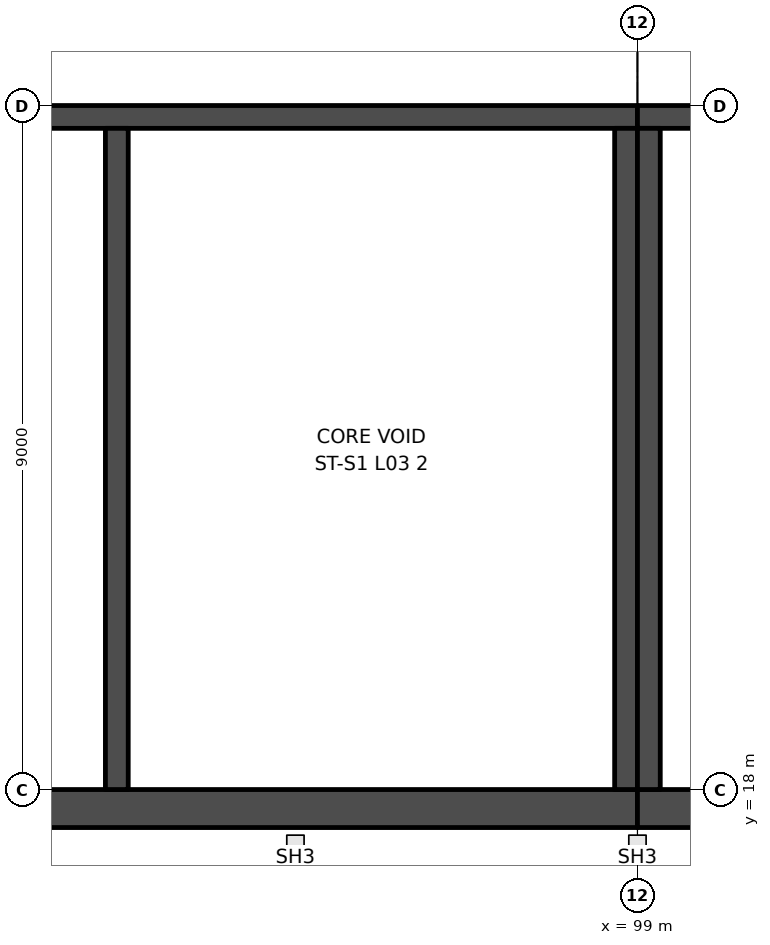
"""IFC4 building model, lengths in metres.
Left out: names, types, materials, properties, quantities, classifications, styles, units other than length and angle.
Written with IfcOpenShell. Run it as: python <this file> out.ifc"""

import sys

from ifc_helpers import new_model, si_unit, direction, frame, frame_2d, origin, place, context, subcontext, project, spatial, rectangle, extrude, element, save


model = new_model("IFC4")
c1 = context("Model", 3, precision=1e-05, world=origin(), true_north=direction((0.0, 1.0)))
c2 = subcontext(c1, "Body", "Model", "MODEL_VIEW")
j1 = project(units=[si_unit("LENGTHUNIT", "METRE"), si_unit("PLANEANGLEUNIT", "RADIAN")], contexts=[c1])
p1 = place(None, origin())
s1 = spatial("IfcSite", under=j1, at=p1, CompositionType="ELEMENT")
p2 = place(p1, origin())
s2 = spatial("IfcBuilding", under=s1, at=p2, CompositionType="ELEMENT")
p3 = place(p2, frame((0.0, 0.0, 22.0)))
s3 = spatial("IfcBuildingStorey", under=s2, at=p3, CompositionType="ELEMENT", Elevation=22.0)
p4 = place(p3, frame((81.0, 26.85, 0.0), z_axis=(0.0, 0.0, 1.0), x_axis=(1.0, 0.0, 0.0)))
e1 = element("IfcWall", 1, at=p4, inside=s3, PredefinedType="SHEAR", context=c2, shape_type="SweptSolid", body=[
    extrude(rectangle(XDim=18.0, YDim=0.3, at=frame_2d((9.0, 0.0))), origin(), (0.0, 0.0, 1.0), 6.0),
])
p5 = place(p4, frame((1.5, 0.0, 0.0)))
e2 = element("IfcOpeningElement", 2, at=p5, cuts=e1, PredefinedType="OPENING", context=c2, shape_type="SweptSolid", body=[
    extrude(rectangle(XDim=1.2, YDim=2.1, at=frame_2d((0.6, 1.05))), frame((0.0, 0.16, 0.0), z_axis=(0.0, -1.0, 0.0), x_axis=(1.0, 0.0, 0.0)), (0.0, 0.0, 1.0), 0.32),
])
p6 = place(p3, frame((81.0, 17.75, 0.0), z_axis=(0.0, 0.0, 1.0), x_axis=(1.0, 0.0, 0.0)))
e3 = element("IfcWall", 3, at=p6, inside=s3, PredefinedType="SHEAR", context=c2, shape_type="SweptSolid", body=[
    extrude(rectangle(XDim=18.0, YDim=0.5, at=frame_2d((9.0, 0.0))), origin(), (0.0, 0.0, 1.0), 6.0),
])
for number, where, z_axis, x_axis in (
    (4, (98.85, 26.7, 0.0), (0.0, 0.0, 1.0), (0.0, -1.0, 0.0)),
    (5, (92.15, 26.7, 0.0), (0.0, 0.0, 1.0), (0.0, -1.0, 0.0)),
):
    element("IfcWall", number, at=place(p3, frame(where, z_axis=z_axis, x_axis=x_axis)), inside=s3, PredefinedType="SHEAR", context=c2, shape_type="SweptSolid", body=[
        extrude(rectangle(XDim=8.7, YDim=0.3, at=frame_2d((4.35, 0.0))), origin(), (0.0, 0.0, 1.0), 6.0),
    ])
p7 = place(p3, frame((117.0, 26.85, 0.0), z_axis=(0.0, 0.0, 1.0), x_axis=(-1.0, 0.0, 0.0)))
e6 = element("IfcWall", 6, at=p7, inside=s3, PredefinedType="SHEAR", context=c2, shape_type="SweptSolid", body=[
    extrude(rectangle(XDim=18.0, YDim=0.3, at=frame_2d((9.0, 0.0))), origin(), (0.0, 0.0, 1.0), 6.0),
])
p8 = place(p7, frame((8.6, 0.0, 0.0)))
e7 = element("IfcOpeningElement", 7, at=p8, cuts=e6, PredefinedType="OPENING", context=c2, shape_type="SweptSolid", body=[
    extrude(rectangle(XDim=1.2, YDim=2.1, at=frame_2d((0.6, 1.05))), frame((0.0, 0.16, 0.0), z_axis=(0.0, -1.0, 0.0), x_axis=(1.0, 0.0, 0.0)), (0.0, 0.0, 1.0), 0.32),
])
p9 = place(p3, frame((117.0, 17.75, 0.0), z_axis=(0.0, 0.0, 1.0), x_axis=(-1.0, 0.0, 0.0)))
e8 = element("IfcWall", 8, at=p9, inside=s3, PredefinedType="SHEAR", context=c2, shape_type="SweptSolid", body=[
    extrude(rectangle(XDim=18.0, YDim=0.5, at=frame_2d((9.0, 0.0))), origin(), (0.0, 0.0, 1.0), 6.0),
])
p10 = place(p3, frame((99.15, 26.7, 0.0), z_axis=(0.0, 0.0, 1.0), x_axis=(0.0, -1.0, 0.0)))
e9 = element("IfcWall", 9, at=p10, inside=s3, PredefinedType="SHEAR", context=c2, shape_type="SweptSolid", body=[
    extrude(rectangle(XDim=8.7, YDim=0.3, at=frame_2d((4.35, 0.0))), origin(), (0.0, 0.0, 1.0), 6.0),
])
save(model, sys.argv[1])
